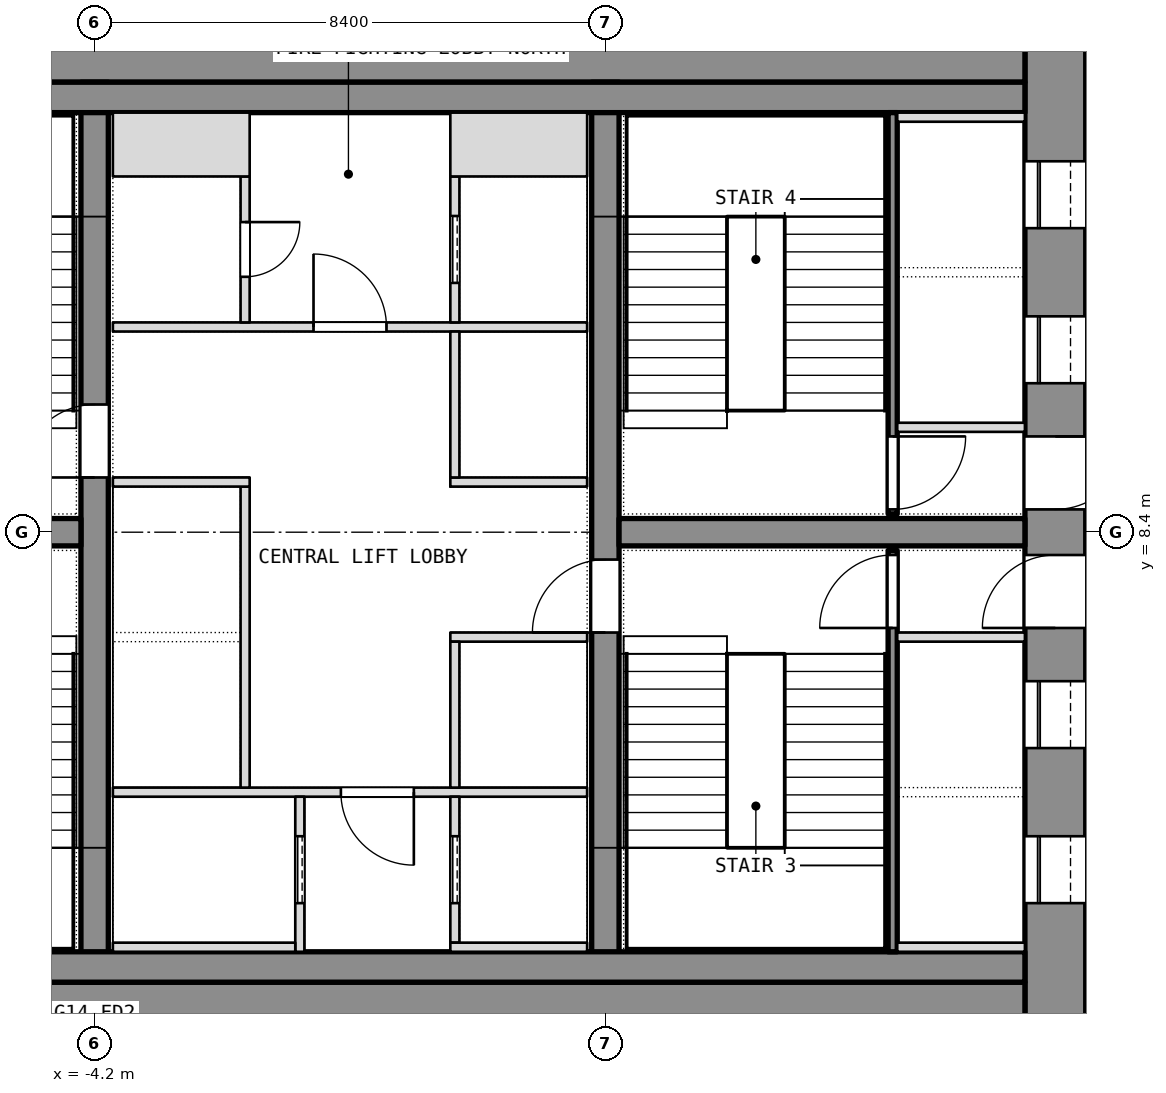
"""IFC4 building model, lengths in metres.
Left out: names, types, materials, properties, quantities, classifications, styles, units other than length and angle.
Written with IfcOpenShell. Run it as: python <this file> out.ifc"""

import sys

from ifc_helpers import new_model, si_unit, direction, frame, frame_2d, origin, place, context, subcontext, project, spatial, rectangle, extrude, element, fill, save


model = new_model("IFC4")
c1 = context("Model", 3, precision=1e-05, world=origin(), true_north=direction((0.0, 1.0)))
c2 = subcontext(c1, "Body", "Model", "MODEL_VIEW")
j1 = project(units=[si_unit("LENGTHUNIT", "METRE"), si_unit("PLANEANGLEUNIT", "RADIAN")], contexts=[c1])
p1 = place(None, origin())
s1 = spatial("IfcSite", under=j1, at=p1, CompositionType="ELEMENT")
p2 = place(p1, origin())
s2 = spatial("IfcBuilding", under=s1, at=p2, CompositionType="ELEMENT")
p3 = place(p2, frame((0.0, 0.0, 166.1)))
s3 = spatial("IfcBuildingStorey", under=s2, at=p3, CompositionType="ELEMENT", Elevation=166.1)
p4 = place(p3, frame((11.6, 0.0, 0.0), z_axis=(0.0, 0.0, 1.0), x_axis=(0.0, 1.0, 0.0)))
e1 = element("IfcWall", 1, at=p4, inside=s3, PredefinedType="SHEAR", context=c2, shape_type="SweptSolid", body=[
    extrude(rectangle(XDim=16.8, YDim=1.0, at=frame_2d((8.4, 0.0))), origin(), (0.0, 0.0, 1.0), 3.6),
])
p5 = place(p4, frame((2.3, 0.0, 0.0)))
e2 = element("IfcOpeningElement", 2, at=p5, cuts=e1, PredefinedType="OPENING", context=c2, shape_type="SweptSolid", body=[
    extrude(rectangle(XDim=1.1, YDim=2.1, at=frame_2d((0.55, 1.05))), frame((0.0, 0.5, 0.0), z_axis=(0.0, -1.0, 0.0), x_axis=(1.0, 0.0, 0.0)), (0.0, 0.0, 1.0), 1.0),
])
p6 = place(p4, frame((4.85, 0.0, 0.0)))
e3 = element("IfcOpeningElement", 3, at=p6, cuts=e1, PredefinedType="OPENING", context=c2, shape_type="SweptSolid", body=[
    extrude(rectangle(XDim=1.1, YDim=2.1, at=frame_2d((0.55, 1.05))), frame((0.0, 0.5, 0.0), z_axis=(0.0, -1.0, 0.0), x_axis=(1.0, 0.0, 0.0)), (0.0, 0.0, 1.0), 1.0),
])
p7 = place(p4, frame((6.825, 0.0, 0.0)))
e4 = element("IfcOpeningElement", 4, at=p7, cuts=e1, PredefinedType="OPENING", context=c2, shape_type="SweptSolid", body=[
    extrude(rectangle(XDim=1.2, YDim=2.1, at=frame_2d((0.6, 1.05))), frame((0.0, 0.5, 0.0), z_axis=(0.0, -1.0, 0.0), x_axis=(1.0, 0.0, 0.0)), (0.0, 0.0, 1.0), 1.0),
])
p8 = place(p4, frame((13.4, 0.0, 0.0)))
e5 = element("IfcOpeningElement", 5, at=p8, cuts=e1, PredefinedType="OPENING", context=c2, shape_type="SweptSolid", body=[
    extrude(rectangle(XDim=1.1, YDim=2.1, at=frame_2d((0.55, 1.05))), frame((0.0, 0.5, 0.0), z_axis=(0.0, -1.0, 0.0), x_axis=(1.0, 0.0, 0.0)), (0.0, 0.0, 1.0), 1.0),
])
p9 = place(p4, frame((10.85, 0.0, 0.0)))
e6 = element("IfcOpeningElement", 6, at=p9, cuts=e1, PredefinedType="OPENING", context=c2, shape_type="SweptSolid", body=[
    extrude(rectangle(XDim=1.1, YDim=2.1, at=frame_2d((0.55, 1.05))), frame((0.0, 0.5, 0.0), z_axis=(0.0, -1.0, 0.0), x_axis=(1.0, 0.0, 0.0)), (0.0, 0.0, 1.0), 1.0),
])
p10 = place(p4, frame((8.775, 0.0, 0.0)))
e7 = element("IfcOpeningElement", 7, at=p10, cuts=e1, PredefinedType="OPENING", context=c2, shape_type="SweptSolid", body=[
    extrude(rectangle(XDim=1.2, YDim=2.1, at=frame_2d((0.6, 1.05))), frame((0.0, 0.5, 0.0), z_axis=(0.0, -1.0, 0.0), x_axis=(1.0, 0.0, 0.0)), (0.0, 0.0, 1.0), 1.0),
])
for number, where, z_axis, x_axis in (
    (8, (-11.1, 0.5, 0.0), (0.0, 0.0, 1.0), (1.0, 0.0, 0.0)),
    (9, (-11.1, 16.3, 0.0), (0.0, 0.0, 1.0), (1.0, 0.0, 0.0)),
):
    element("IfcWall", number, at=place(p3, frame(where, z_axis=z_axis, x_axis=x_axis)), inside=s3, PredefinedType="SHEAR", context=c2, shape_type="SweptSolid", body=[
        extrude(rectangle(XDim=22.2, YDim=1.0, at=frame_2d((11.1, 0.0))), origin(), (0.0, 0.0, 1.0), 3.6),
    ])
p11 = place(p3, frame((-4.2, 1.0, 0.0), z_axis=(0.0, 0.0, 1.0), x_axis=(0.0, 1.0, 0.0)))
e10 = element("IfcWall", 10, at=p11, inside=s3, PredefinedType="SHEAR", context=c2, shape_type="SweptSolid", body=[
    extrude(rectangle(XDim=14.8, YDim=0.45, at=frame_2d((7.4, 0.0))), origin(), (0.0, 0.0, 1.0), 3.6),
])
p12 = place(p11, frame((8.3, 0.0, 0.0)))
e11 = element("IfcOpeningElement", 11, at=p12, cuts=e10, PredefinedType="OPENING", context=c2, shape_type="SweptSolid", body=[
    extrude(rectangle(XDim=1.2, YDim=2.1, at=frame_2d((0.6, 1.05))), frame((0.0, 0.225, 0.0), z_axis=(0.0, -1.0, 0.0), x_axis=(1.0, 0.0, 0.0)), (0.0, 0.0, 1.0), 0.45),
])
p13 = place(p3, frame((4.2, 1.0, 0.0), z_axis=(0.0, 0.0, 1.0), x_axis=(0.0, 1.0, 0.0)))
e12 = element("IfcWall", 12, at=p13, inside=s3, PredefinedType="SHEAR", context=c2, shape_type="SweptSolid", body=[
    extrude(rectangle(XDim=14.8, YDim=0.45, at=frame_2d((7.4, 0.0))), origin(), (0.0, 0.0, 1.0), 3.6),
])
p14 = place(p13, frame((5.75, 0.0, 0.0)))
e13 = element("IfcOpeningElement", 13, at=p14, cuts=e12, PredefinedType="OPENING", context=c2, shape_type="SweptSolid", body=[
    extrude(rectangle(XDim=1.2, YDim=2.1, at=frame_2d((0.6, 1.05))), frame((0.0, 0.225, 0.0), z_axis=(0.0, -1.0, 0.0), x_axis=(1.0, 0.0, 0.0)), (0.0, 0.0, 1.0), 0.45),
])
for number, where, z_axis, x_axis in (
    (14, (-11.1, 8.4, 0.0), (0.0, 0.0, 1.0), (1.0, 0.0, 0.0)),
    (15, (4.425, 8.4, 0.0), (0.0, 0.0, 1.0), (1.0, 0.0, 0.0)),
):
    element("IfcWall", number, at=place(p3, frame(where, z_axis=z_axis, x_axis=x_axis)), inside=s3, PredefinedType="SHEAR", context=c2, shape_type="SweptSolid", body=[
        extrude(rectangle(XDim=6.675, YDim=0.45, at=frame_2d((3.337, 0.0))), origin(), (0.0, 0.0, 1.0), 3.6),
    ])
for number, where, z_axis, x_axis in (
    (16, (-11.1, 1.25, 0.0), (0.0, 0.0, 1.0), (1.0, 0.0, 0.0)),
    (17, (-11.1, 15.55, 0.0), (0.0, 0.0, 1.0), (1.0, 0.0, 0.0)),
):
    element("IfcWall", number, at=place(p3, frame(where, z_axis=z_axis, x_axis=x_axis)), inside=s3, PredefinedType="PARTITIONING", context=c2, shape_type="SweptSolid", body=[
        extrude(rectangle(XDim=22.2, YDim=0.5, at=frame_2d((11.1, 0.0))), origin(), (0.0, 0.0, 1.0), 3.3),
    ])
p15 = place(p3, frame((8.925, 1.5, 0.0), z_axis=(0.0, 0.0, 1.0), x_axis=(0.0, 1.0, 0.0)))
e18 = element("IfcWall", 18, at=p15, inside=s3, PredefinedType="SHEAR", context=c2, shape_type="SweptSolid", body=[
    extrude(rectangle(XDim=6.6, YDim=0.15, at=frame_2d((3.3, 0.0))), origin(), (0.0, 0.0, 1.0), 3.3),
])
p16 = place(p15, frame((5.325, 0.0, 0.0)))
e19 = element("IfcOpeningElement", 19, at=p16, cuts=e18, PredefinedType="OPENING", context=c2, shape_type="SweptSolid", body=[
    extrude(rectangle(XDim=1.2, YDim=2.1, at=frame_2d((0.6, 1.05))), frame((0.0, 0.075, 0.0), z_axis=(0.0, -1.0, 0.0), x_axis=(1.0, 0.0, 0.0)), (0.0, 0.0, 1.0), 0.15),
])
for number, where, z_axis, x_axis in (
    (20, (9.0, 6.675, 0.0), (0.0, 0.0, 1.0), (1.0, 0.0, 0.0)),
    (21, (9.0, 1.575, 0.0), (0.0, 0.0, 1.0), (1.0, 0.0, 0.0)),
):
    element("IfcWall", number, at=place(p3, frame(where, z_axis=z_axis, x_axis=x_axis)), inside=s3, PredefinedType="SHEAR", context=c2, shape_type="SweptSolid", body=[
        extrude(rectangle(XDim=2.1, YDim=0.15, at=frame_2d((1.05, 0.0))), origin(), (0.0, 0.0, 1.0), 3.6),
    ])
p17 = place(p3, frame((8.925, 8.7, 0.0), z_axis=(0.0, 0.0, 1.0), x_axis=(0.0, 1.0, 0.0)))
e22 = element("IfcWall", 22, at=p17, inside=s3, PredefinedType="SHEAR", context=c2, shape_type="SweptSolid", body=[
    extrude(rectangle(XDim=6.6, YDim=0.15, at=frame_2d((3.3, 0.0))), origin(), (0.0, 0.0, 1.0), 3.3),
])
p18 = place(p17, frame((0.075, 0.0, 0.0)))
e23 = element("IfcOpeningElement", 23, at=p18, cuts=e22, PredefinedType="OPENING", context=c2, shape_type="SweptSolid", body=[
    extrude(rectangle(XDim=1.2, YDim=2.1, at=frame_2d((0.6, 1.05))), frame((0.0, 0.075, 0.0), z_axis=(0.0, -1.0, 0.0), x_axis=(1.0, 0.0, 0.0)), (0.0, 0.0, 1.0), 0.15),
])
for number, where, z_axis, x_axis in (
    (24, (9.0, 10.125, 0.0), (0.0, 0.0, 1.0), (1.0, 0.0, 0.0)),
    (25, (9.0, 15.225, 0.0), (0.0, 0.0, 1.0), (1.0, 0.0, 0.0)),
):
    element("IfcWall", number, at=place(p3, frame(where, z_axis=z_axis, x_axis=x_axis)), inside=s3, PredefinedType="SHEAR", context=c2, shape_type="SweptSolid", body=[
        extrude(rectangle(XDim=2.1, YDim=0.15, at=frame_2d((1.05, 0.0))), origin(), (0.0, 0.0, 1.0), 3.6),
    ])
p19 = place(p3, frame((-3.9, 4.125, 0.0), z_axis=(0.0, 0.0, 1.0), x_axis=(1.0, 0.0, 0.0)))
e26 = element("IfcWall", 26, at=p19, inside=s3, PredefinedType="PARTITIONING", context=c2, shape_type="SweptSolid", body=[
    extrude(rectangle(XDim=7.8, YDim=0.15, at=frame_2d((3.9, 0.0))), origin(), (0.0, 0.0, 1.0), 3.3),
])
p20 = place(p19, frame((3.75, 0.0, 0.0)))
e27 = element("IfcOpeningElement", 27, at=p20, cuts=e26, PredefinedType="OPENING", context=c2, shape_type="SweptSolid", body=[
    extrude(rectangle(XDim=1.2, YDim=2.1, at=frame_2d((0.6, 1.05))), frame((0.0, 0.075, 0.0), z_axis=(0.0, -1.0, 0.0), x_axis=(1.0, 0.0, 0.0)), (0.0, 0.0, 1.0), 0.15),
])
p21 = place(p3, frame((-3.9, 11.775, 0.0), z_axis=(0.0, 0.0, 1.0), x_axis=(1.0, 0.0, 0.0)))
e28 = element("IfcWall", 28, at=p21, inside=s3, PredefinedType="PARTITIONING", context=c2, shape_type="SweptSolid", body=[
    extrude(rectangle(XDim=7.8, YDim=0.15, at=frame_2d((3.9, 0.0))), origin(), (0.0, 0.0, 1.0), 3.3),
])
p22 = place(p21, frame((3.3, 0.0, 0.0)))
e29 = element("IfcOpeningElement", 29, at=p22, cuts=e28, PredefinedType="OPENING", context=c2, shape_type="SweptSolid", body=[
    extrude(rectangle(XDim=1.2, YDim=2.1, at=frame_2d((0.6, 1.05))), frame((0.0, 0.075, 0.0), z_axis=(0.0, -1.0, 0.0), x_axis=(1.0, 0.0, 0.0)), (0.0, 0.0, 1.0), 0.15),
])
p23 = place(p3, frame((-0.825, 1.5, 0.0), z_axis=(0.0, 0.0, 1.0), x_axis=(0.0, 1.0, 0.0)))
e30 = element("IfcWall", 30, at=p23, inside=s3, PredefinedType="SHEAR", context=c2, shape_type="SweptSolid", body=[
    extrude(rectangle(XDim=2.55, YDim=0.15, at=frame_2d((1.275, 0.0))), origin(), (0.0, 0.0, 1.0), 3.6),
])
p24 = place(p23, frame((0.8, 0.0, 0.0)))
e31 = element("IfcOpeningElement", 31, at=p24, cuts=e30, PredefinedType="OPENING", context=c2, shape_type="SweptSolid", body=[
    extrude(rectangle(XDim=1.1, YDim=2.1, at=frame_2d((0.55, 1.05))), frame((0.0, 0.075, 0.0), z_axis=(0.0, -1.0, 0.0), x_axis=(1.0, 0.0, 0.0)), (0.0, 0.0, 1.0), 0.15),
])
p25 = place(p3, frame((-3.9, 1.575, 0.0), z_axis=(0.0, 0.0, 1.0), x_axis=(1.0, 0.0, 0.0)))
e32 = element("IfcWall", 32, at=p25, inside=s3, PredefinedType="SHEAR", context=c2, shape_type="SweptSolid", body=[
    extrude(rectangle(XDim=3.0, YDim=0.15, at=frame_2d((1.5, 0.0))), origin(), (0.0, 0.0, 1.0), 3.6),
])
p26 = place(p3, frame((-1.725, 4.2, 0.0), z_axis=(0.0, 0.0, 1.0), x_axis=(0.0, 1.0, 0.0)))
e33 = element("IfcWall", 33, at=p26, inside=s3, PredefinedType="SHEAR", context=c2, shape_type="SweptSolid", body=[
    extrude(rectangle(XDim=4.95, YDim=0.15, at=frame_2d((2.475, 0.0))), origin(), (0.0, 0.0, 1.0), 3.6),
])
p27 = place(p3, frame((-3.9, 9.225, 0.0), z_axis=(0.0, 0.0, 1.0), x_axis=(1.0, 0.0, 0.0)))
e34 = element("IfcWall", 34, at=p27, inside=s3, PredefinedType="SHEAR", context=c2, shape_type="SweptSolid", body=[
    extrude(rectangle(XDim=2.25, YDim=0.15, at=frame_2d((1.125, 0.0))), origin(), (0.0, 0.0, 1.0), 3.6),
])
p28 = place(p3, frame((-1.725, 11.85, 0.0), z_axis=(0.0, 0.0, 1.0), x_axis=(0.0, 1.0, 0.0)))
e35 = element("IfcWall", 35, at=p28, inside=s3, PredefinedType="PARTITIONING", context=c2, shape_type="SweptSolid", body=[
    extrude(rectangle(XDim=2.4, YDim=0.15, at=frame_2d((1.2, 0.0))), origin(), (0.0, 0.0, 1.0), 3.3),
])
p29 = place(p28, frame((0.75, 0.0, 0.0)))
e36 = element("IfcOpeningElement", 36, at=p29, cuts=e35, PredefinedType="OPENING", context=c2, shape_type="SweptSolid", body=[
    extrude(rectangle(XDim=0.9, YDim=2.1, at=frame_2d((0.45, 1.05))), frame((0.0, 0.075, 0.0), z_axis=(0.0, -1.0, 0.0), x_axis=(1.0, 0.0, 0.0)), (0.0, 0.0, 1.0), 0.15),
])
p30 = place(p3, frame((-3.9, 14.775, 0.0), z_axis=(0.0, 0.0, 1.0), x_axis=(1.0, 0.0, 0.0)))
e37 = element("IfcWall", 37, at=p30, inside=s3, PredefinedType="PARTITIONING", context=c2, shape_type="SweptSolid", body=[
    extrude(rectangle(XDim=2.25, YDim=1.05, at=frame_2d((1.125, 0.0))), origin(), (0.0, 0.0, 1.0), 3.3),
])
p31 = place(p3, frame((1.725, 1.65, 0.0), z_axis=(0.0, 0.0, 1.0), x_axis=(0.0, 1.0, 0.0)))
e38 = element("IfcWall", 38, at=p31, inside=s3, PredefinedType="SHEAR", context=c2, shape_type="SweptSolid", body=[
    extrude(rectangle(XDim=2.4, YDim=0.15, at=frame_2d((1.2, 0.0))), origin(), (0.0, 0.0, 1.0), 3.6),
])
p32 = place(p31, frame((0.65, 0.0, 0.0)))
e39 = element("IfcOpeningElement", 39, at=p32, cuts=e38, PredefinedType="OPENING", context=c2, shape_type="SweptSolid", body=[
    extrude(rectangle(XDim=1.1, YDim=2.1, at=frame_2d((0.55, 1.05))), frame((0.0, 0.075, 0.0), z_axis=(0.0, -1.0, 0.0), x_axis=(1.0, 0.0, 0.0)), (0.0, 0.0, 1.0), 0.15),
])
p33 = place(p3, frame((1.65, 1.575, 0.0), z_axis=(0.0, 0.0, 1.0), x_axis=(1.0, 0.0, 0.0)))
e40 = element("IfcWall", 40, at=p33, inside=s3, PredefinedType="SHEAR", context=c2, shape_type="SweptSolid", body=[
    extrude(rectangle(XDim=2.25, YDim=0.15, at=frame_2d((1.125, 0.0))), origin(), (0.0, 0.0, 1.0), 3.6),
])
p34 = place(p3, frame((1.725, 11.85, 0.0), z_axis=(0.0, 0.0, 1.0), x_axis=(0.0, 1.0, 0.0)))
e41 = element("IfcWall", 41, at=p34, inside=s3, PredefinedType="SHEAR", context=c2, shape_type="SweptSolid", body=[
    extrude(rectangle(XDim=2.4, YDim=0.15, at=frame_2d((1.2, 0.0))), origin(), (0.0, 0.0, 1.0), 3.6),
])
p35 = place(p34, frame((0.65, 0.0, 0.0)))
e42 = element("IfcOpeningElement", 42, at=p35, cuts=e41, PredefinedType="OPENING", context=c2, shape_type="SweptSolid", body=[
    extrude(rectangle(XDim=1.1, YDim=2.1, at=frame_2d((0.55, 1.05))), frame((0.0, 0.075, 0.0), z_axis=(0.0, -1.0, 0.0), x_axis=(1.0, 0.0, 0.0)), (0.0, 0.0, 1.0), 0.15),
])
p36 = place(p3, frame((1.65, 14.775, 0.0), z_axis=(0.0, 0.0, 1.0), x_axis=(1.0, 0.0, 0.0)))
e43 = element("IfcWall", 43, at=p36, inside=s3, PredefinedType="SHEAR", context=c2, shape_type="SweptSolid", body=[
    extrude(rectangle(XDim=2.25, YDim=1.05, at=frame_2d((1.125, 0.0))), origin(), (0.0, 0.0, 1.0), 3.6),
])
for number, where, z_axis, x_axis in (
    (44, (1.65, 6.675, 0.0), (0.0, 0.0, 1.0), (1.0, 0.0, 0.0)),
    (45, (1.65, 9.225, 0.0), (0.0, 0.0, 1.0), (1.0, 0.0, 0.0)),
):
    element("IfcWall", number, at=place(p3, frame(where, z_axis=z_axis, x_axis=x_axis)), inside=s3, PredefinedType="SHEAR", context=c2, shape_type="SweptSolid", body=[
        extrude(rectangle(XDim=2.25, YDim=0.15, at=frame_2d((1.125, 0.0))), origin(), (0.0, 0.0, 1.0), 3.6),
    ])
p37 = place(p3, frame((1.725, 4.2, 0.0), z_axis=(0.0, 0.0, 1.0), x_axis=(0.0, 1.0, 0.0)))
e46 = element("IfcWall", 46, at=p37, inside=s3, PredefinedType="SHEAR", context=c2, shape_type="SweptSolid", body=[
    extrude(rectangle(XDim=2.4, YDim=0.15, at=frame_2d((1.2, 0.0))), origin(), (0.0, 0.0, 1.0), 3.6),
])
p38 = place(p3, frame((1.725, 9.3, 0.0), z_axis=(0.0, 0.0, 1.0), x_axis=(0.0, 1.0, 0.0)))
e47 = element("IfcWall", 47, at=p38, inside=s3, PredefinedType="SHEAR", context=c2, shape_type="SweptSolid", body=[
    extrude(rectangle(XDim=2.4, YDim=0.15, at=frame_2d((1.2, 0.0))), origin(), (0.0, 0.0, 1.0), 3.6),
])
p39 = place(p5, origin())
e48 = element("IfcDoor", 48, at=p39, inside=s3, OperationType="SLIDING_TO_LEFT", PredefinedType="DOOR", context=c2, shape_type="SweptSolid", body=[
    extrude(rectangle(XDim=1.1, YDim=2.1, at=frame_2d((0.55, 1.05))), frame((0.0, 0.025, 0.0), z_axis=(0.0, -1.0, 0.0), x_axis=(1.0, 0.0, 0.0)), (0.0, 0.0, 1.0), 0.05),
])
fill(e2, e48)
p40 = place(p6, origin())
e49 = element("IfcDoor", 49, at=p40, inside=s3, OperationType="SLIDING_TO_LEFT", PredefinedType="DOOR", context=c2, shape_type="SweptSolid", body=[
    extrude(rectangle(XDim=1.1, YDim=2.1, at=frame_2d((0.55, 1.05))), frame((0.0, 0.025, 0.0), z_axis=(0.0, -1.0, 0.0), x_axis=(1.0, 0.0, 0.0)), (0.0, 0.0, 1.0), 0.05),
])
fill(e3, e49)
p41 = place(p7, origin())
e50 = element("IfcDoor", 50, at=p41, inside=s3, OperationType="SINGLE_SWING_LEFT", PredefinedType="DOOR", context=c2, shape_type="SweptSolid", body=[
    extrude(rectangle(XDim=1.2, YDim=2.1, at=frame_2d((0.6, 1.05))), frame((0.0, 0.025, 0.0), z_axis=(0.0, -1.0, 0.0), x_axis=(1.0, 0.0, 0.0)), (0.0, 0.0, 1.0), 0.05),
])
fill(e4, e50)
p42 = place(p16, origin())
e51 = element("IfcDoor", 51, at=p42, inside=s3, OperationType="SINGLE_SWING_LEFT", PredefinedType="DOOR", context=c2, shape_type="SweptSolid", body=[
    extrude(rectangle(XDim=1.2, YDim=2.1, at=frame_2d((0.6, 1.05))), frame((0.0, 0.025, 0.0), z_axis=(0.0, -1.0, 0.0), x_axis=(1.0, 0.0, 0.0)), (0.0, 0.0, 1.0), 0.05),
])
fill(e19, e51)
p43 = place(p8, origin())
e52 = element("IfcDoor", 52, at=p43, inside=s3, OperationType="SLIDING_TO_LEFT", PredefinedType="DOOR", context=c2, shape_type="SweptSolid", body=[
    extrude(rectangle(XDim=1.1, YDim=2.1, at=frame_2d((0.55, 1.05))), frame((0.0, 0.025, 0.0), z_axis=(0.0, -1.0, 0.0), x_axis=(1.0, 0.0, 0.0)), (0.0, 0.0, 1.0), 0.05),
])
fill(e5, e52)
p44 = place(p9, origin())
e53 = element("IfcDoor", 53, at=p44, inside=s3, OperationType="SLIDING_TO_LEFT", PredefinedType="DOOR", context=c2, shape_type="SweptSolid", body=[
    extrude(rectangle(XDim=1.1, YDim=2.1, at=frame_2d((0.55, 1.05))), frame((0.0, 0.025, 0.0), z_axis=(0.0, -1.0, 0.0), x_axis=(1.0, 0.0, 0.0)), (0.0, 0.0, 1.0), 0.05),
])
fill(e6, e53)
p45 = place(p10, origin())
e54 = element("IfcDoor", 54, at=p45, inside=s3, OperationType="SINGLE_SWING_LEFT", PredefinedType="DOOR", context=c2, shape_type="SweptSolid", body=[
    extrude(rectangle(XDim=1.2, YDim=2.1, at=frame_2d((0.6, 1.05))), frame((0.0, 0.025, 0.0), z_axis=(0.0, -1.0, 0.0), x_axis=(1.0, 0.0, 0.0)), (0.0, 0.0, 1.0), 0.05),
])
fill(e7, e54)
p46 = place(p18, origin())
e55 = element("IfcDoor", 55, at=p46, inside=s3, OperationType="SINGLE_SWING_LEFT", PredefinedType="DOOR", context=c2, shape_type="SweptSolid", body=[
    extrude(rectangle(XDim=1.2, YDim=2.1, at=frame_2d((0.6, 1.05))), frame((0.0, 0.025, 0.0), z_axis=(0.0, -1.0, 0.0), x_axis=(1.0, 0.0, 0.0)), (0.0, 0.0, 1.0), 0.05),
])
fill(e23, e55)
p47 = place(p24, origin())
e56 = element("IfcDoor", 56, at=p47, inside=s3, OperationType="SLIDING_TO_LEFT", PredefinedType="DOOR", context=c2, shape_type="SweptSolid", body=[
    extrude(rectangle(XDim=1.1, YDim=2.1, at=frame_2d((0.55, 1.05))), frame((0.0, 0.025, 0.0), z_axis=(0.0, -1.0, 0.0), x_axis=(1.0, 0.0, 0.0)), (0.0, 0.0, 1.0), 0.05),
])
fill(e31, e56)
p48 = place(p32, origin())
e57 = element("IfcDoor", 57, at=p48, inside=s3, OperationType="SLIDING_TO_LEFT", PredefinedType="DOOR", context=c2, shape_type="SweptSolid", body=[
    extrude(rectangle(XDim=1.1, YDim=2.1, at=frame_2d((0.55, 1.05))), frame((0.0, 0.025, 0.0), z_axis=(0.0, -1.0, 0.0), x_axis=(1.0, 0.0, 0.0)), (0.0, 0.0, 1.0), 0.05),
])
fill(e39, e57)
p49 = place(p35, origin())
e58 = element("IfcDoor", 58, at=p49, inside=s3, OperationType="SLIDING_TO_LEFT", PredefinedType="DOOR", context=c2, shape_type="SweptSolid", body=[
    extrude(rectangle(XDim=1.1, YDim=2.1, at=frame_2d((0.55, 1.05))), frame((0.0, 0.025, 0.0), z_axis=(0.0, -1.0, 0.0), x_axis=(1.0, 0.0, 0.0)), (0.0, 0.0, 1.0), 0.05),
])
fill(e42, e58)
p50 = place(p20, origin())
e59 = element("IfcDoor", 59, at=p50, inside=s3, OperationType="SINGLE_SWING_LEFT", PredefinedType="DOOR", context=c2, shape_type="SweptSolid", body=[
    extrude(rectangle(XDim=1.2, YDim=2.1, at=frame_2d((0.6, 1.05))), frame((0.0, 0.025, 0.0), z_axis=(0.0, -1.0, 0.0), x_axis=(1.0, 0.0, 0.0)), (0.0, 0.0, 1.0), 0.05),
])
fill(e27, e59)
p51 = place(p22, origin())
e60 = element("IfcDoor", 60, at=p51, inside=s3, OperationType="SINGLE_SWING_LEFT", PredefinedType="DOOR", context=c2, shape_type="SweptSolid", body=[
    extrude(rectangle(XDim=1.2, YDim=2.1, at=frame_2d((0.6, 1.05))), frame((0.0, 0.025, 0.0), z_axis=(0.0, -1.0, 0.0), x_axis=(1.0, 0.0, 0.0)), (0.0, 0.0, 1.0), 0.05),
])
fill(e29, e60)
p52 = place(p29, origin())
e61 = element("IfcDoor", 61, at=p52, inside=s3, OperationType="SINGLE_SWING_LEFT", PredefinedType="DOOR", context=c2, shape_type="SweptSolid", body=[
    extrude(rectangle(XDim=0.9, YDim=2.1, at=frame_2d((0.45, 1.05))), frame((0.0, 0.025, 0.0), z_axis=(0.0, -1.0, 0.0), x_axis=(1.0, 0.0, 0.0)), (0.0, 0.0, 1.0), 0.05),
])
fill(e36, e61)
p53 = place(p12, origin())
e62 = element("IfcDoor", 62, at=p53, inside=s3, OperationType="SINGLE_SWING_LEFT", PredefinedType="DOOR", context=c2, shape_type="SweptSolid", body=[
    extrude(rectangle(XDim=1.2, YDim=2.1, at=frame_2d((0.6, 1.05))), frame((0.0, 0.025, 0.0), z_axis=(0.0, -1.0, 0.0), x_axis=(1.0, 0.0, 0.0)), (0.0, 0.0, 1.0), 0.05),
])
fill(e11, e62)
p54 = place(p14, origin())
e63 = element("IfcDoor", 63, at=p54, inside=s3, OperationType="SINGLE_SWING_LEFT", PredefinedType="DOOR", context=c2, shape_type="SweptSolid", body=[
    extrude(rectangle(XDim=1.2, YDim=2.1, at=frame_2d((0.6, 1.05))), frame((0.0, 0.025, 0.0), z_axis=(0.0, -1.0, 0.0), x_axis=(1.0, 0.0, 0.0)), (0.0, 0.0, 1.0), 0.05),
])
fill(e13, e63)
save(model, sys.argv[1])
